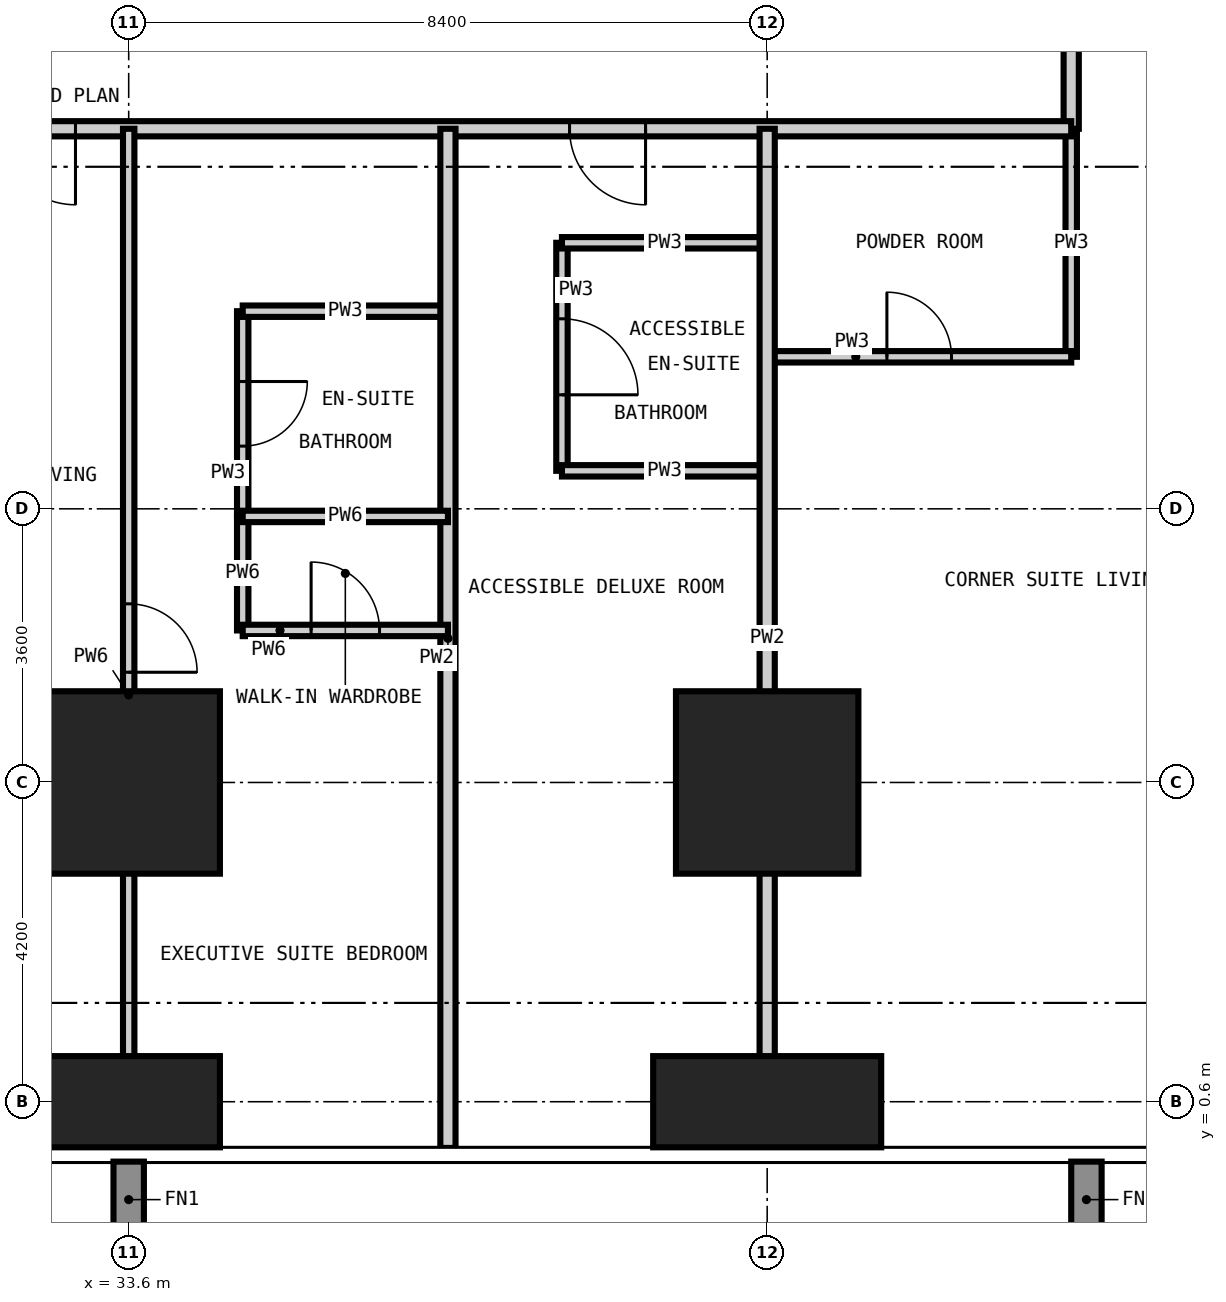
"""IFC4 building model, lengths in metres.
Left out: names, types, materials, properties, quantities, classifications, styles, units other than length and angle.
Written with IfcOpenShell. Run it as: python <this file> out.ifc"""

import sys

from ifc_helpers import new_model, si_unit, direction, frame, frame_2d, origin, origin_2d, place, context, subcontext, project, spatial, rectangle, extrude, element, fill, save


model = new_model("IFC4")
c1 = context("Model", 3, precision=1e-05, world=origin(), true_north=direction((0.0, 1.0)))
c2 = subcontext(c1, "Body", "Model", "MODEL_VIEW")
j1 = project(units=[si_unit("LENGTHUNIT", "METRE"), si_unit("PLANEANGLEUNIT", "RADIAN")], contexts=[c1])
p1 = place(None, origin())
s1 = spatial("IfcSite", under=j1, at=p1, CompositionType="ELEMENT")
p2 = place(p1, origin())
s2 = spatial("IfcBuilding", under=s1, at=p2, CompositionType="ELEMENT")
p3 = place(p2, frame((0.0, 0.0, 84.6)))
s3 = spatial("IfcBuildingStorey", under=s2, at=p3, CompositionType="ELEMENT", Elevation=84.6)
p4 = place(p3, frame((33.6, 0.6, -0.35), z_axis=(0.0, 0.0, 1.0), x_axis=(1.0, 0.0, 0.0)))
e1 = element("IfcColumn", 1, at=p4, inside=s3, PredefinedType="COLUMN", context=c2, shape_type="SweptSolid", body=[
    extrude(rectangle(XDim=2.4, YDim=1.2, at=origin_2d()), origin(), (0.0, 0.0, 1.0), 3.55),
])
p5 = place(p3, frame((33.6, 4.8, -0.35), z_axis=(0.0, 0.0, 1.0), x_axis=(1.0, 0.0, 0.0)))
e2 = element("IfcColumn", 2, at=p5, inside=s3, PredefinedType="COLUMN", context=c2, shape_type="SweptSolid", body=[
    extrude(rectangle(XDim=2.4, YDim=2.4, at=origin_2d()), origin(), (0.0, 0.0, 1.0), 3.55),
])
p6 = place(p3, frame((42.0, 0.6, -0.35), z_axis=(0.0, 0.0, 1.0), x_axis=(1.0, 0.0, 0.0)))
e3 = element("IfcColumn", 3, at=p6, inside=s3, PredefinedType="COLUMN", context=c2, shape_type="SweptSolid", body=[
    extrude(rectangle(XDim=3.0, YDim=1.2, at=origin_2d()), origin(), (0.0, 0.0, 1.0), 3.55),
])
p7 = place(p3, frame((42.0, 4.8, -0.35), z_axis=(0.0, 0.0, 1.0), x_axis=(1.0, 0.0, 0.0)))
e4 = element("IfcColumn", 4, at=p7, inside=s3, PredefinedType="COLUMN", context=c2, shape_type="SweptSolid", body=[
    extrude(rectangle(XDim=2.4, YDim=2.4, at=origin_2d()), origin(), (0.0, 0.0, 1.0), 3.55),
])
p8 = place(p3, frame((35.1, 8.3, 0.0), z_axis=(0.0, 0.0, 1.0), x_axis=(0.0, 1.0, 0.0)))
e5 = element("IfcWall", 5, at=p8, inside=s3, PredefinedType="PARTITIONING", context=c2, shape_type="SweptSolid", body=[
    extrude(rectangle(XDim=2.7, YDim=0.15, at=frame_2d((1.35, 0.0))), origin(), (0.0, 0.0, 1.0), 3.2),
])
p9 = place(p8, frame((0.925, 0.0, 0.0)))
e6 = element("IfcOpeningElement", 6, at=p9, cuts=e5, PredefinedType="OPENING", context=c2, shape_type="SweptSolid", body=[
    extrude(rectangle(XDim=0.85, YDim=2.1, at=frame_2d((0.425, 1.05))), frame((0.0, 0.085, 0.0), z_axis=(0.0, -1.0, 0.0), x_axis=(1.0, 0.0, 0.0)), (0.0, 0.0, 1.0), 0.17),
])
p10 = place(p3, frame((39.3, 8.9, 0.0), z_axis=(0.0, 0.0, 1.0), x_axis=(0.0, 1.0, 0.0)))
e7 = element("IfcWall", 7, at=p10, inside=s3, PredefinedType="PARTITIONING", context=c2, shape_type="SweptSolid", body=[
    extrude(rectangle(XDim=3.0, YDim=0.15, at=frame_2d((1.5, 0.0))), origin(), (0.0, 0.0, 1.0), 3.2),
])
p11 = place(p10, frame((1.0, 0.0, 0.0)))
e8 = element("IfcOpeningElement", 8, at=p11, cuts=e7, PredefinedType="OPENING", context=c2, shape_type="SweptSolid", body=[
    extrude(rectangle(XDim=1.0, YDim=2.1, at=frame_2d((0.5, 1.05))), frame((0.0, 0.085, 0.0), z_axis=(0.0, -1.0, 0.0), x_axis=(1.0, 0.0, 0.0)), (0.0, 0.0, 1.0), 0.17),
])
p12 = place(p3, frame((46.0, 10.4, 0.0), z_axis=(0.0, 0.0, 1.0), x_axis=(0.0, 1.0, 0.0)))
e9 = element("IfcWall", 9, at=p12, inside=s3, PredefinedType="PARTITIONING", context=c2, shape_type="SweptSolid", body=[
    extrude(rectangle(XDim=3.0, YDim=0.15, at=frame_2d((1.5, 0.0))), origin(), (0.0, 0.0, 1.0), 3.2),
])
p13 = place(p3, frame((39.3, 8.9, 0.0), z_axis=(0.0, 0.0, 1.0), x_axis=(1.0, 0.0, 0.0)))
e10 = element("IfcWall", 10, at=p13, inside=s3, PredefinedType="PARTITIONING", context=c2, shape_type="SweptSolid", body=[
    extrude(rectangle(XDim=2.7, YDim=0.15, at=frame_2d((1.35, 0.0))), origin(), (0.0, 0.0, 1.0), 3.2),
])
p14 = place(p3, frame((42.0, 10.4, 0.0), z_axis=(0.0, 0.0, 1.0), x_axis=(1.0, 0.0, 0.0)))
e11 = element("IfcWall", 11, at=p14, inside=s3, PredefinedType="PARTITIONING", context=c2, shape_type="SweptSolid", body=[
    extrude(rectangle(XDim=4.0, YDim=0.15, at=frame_2d((2.0, 0.0))), origin(), (0.0, 0.0, 1.0), 3.2),
])
p15 = place(p14, frame((1.575, 0.0, 0.0)))
e12 = element("IfcOpeningElement", 12, at=p15, cuts=e11, PredefinedType="OPENING", context=c2, shape_type="SweptSolid", body=[
    extrude(rectangle(XDim=0.85, YDim=2.1, at=frame_2d((0.425, 1.05))), frame((0.0, 0.085, 0.0), z_axis=(0.0, -1.0, 0.0), x_axis=(1.0, 0.0, 0.0)), (0.0, 0.0, 1.0), 0.17),
])
for number, where, z_axis, x_axis in (
    (13, (35.1, 11.0, 0.0), (0.0, 0.0, 1.0), (1.0, 0.0, 0.0)),
    (14, (39.3, 11.9, 0.0), (0.0, 0.0, 1.0), (1.0, 0.0, 0.0)),
):
    element("IfcWall", number, at=place(p3, frame(where, z_axis=z_axis, x_axis=x_axis)), inside=s3, PredefinedType="PARTITIONING", context=c2, shape_type="SweptSolid", body=[
        extrude(rectangle(XDim=2.7, YDim=0.15, at=frame_2d((1.35, 0.0))), origin(), (0.0, 0.0, 1.0), 3.2),
    ])
p16 = place(p3, frame((46.0, 44.8, 0.0), z_axis=(0.0, 0.0, 1.0), x_axis=(0.0, -1.0, 0.0)))
e15 = element("IfcWall", 15, at=p16, inside=s3, PredefinedType="PARTITIONING", context=c2, shape_type="SweptSolid", body=[
    extrude(rectangle(XDim=31.4, YDim=0.2, at=frame_2d((15.7, 0.0))), origin(), (0.0, 0.0, 1.0), 3.2),
])
p17 = place(p16, frame((21.2, 0.0, 0.0)))
e16 = element("IfcOpeningElement", 16, at=p17, cuts=e15, PredefinedType="OPENING", context=c2, shape_type="SweptSolid", body=[
    extrude(rectangle(XDim=1.0, YDim=2.2, at=frame_2d((0.5, 1.1))), frame((0.0, 0.11, 0.0), z_axis=(0.0, -1.0, 0.0), x_axis=(1.0, 0.0, 0.0)), (0.0, 0.0, 1.0), 0.22),
])
p18 = place(p16, frame((8.6, 0.0, 0.0)))
e17 = element("IfcOpeningElement", 17, at=p18, cuts=e15, PredefinedType="OPENING", context=c2, shape_type="SweptSolid", body=[
    extrude(rectangle(XDim=1.0, YDim=2.2, at=frame_2d((0.5, 1.1))), frame((0.0, 0.11, 0.0), z_axis=(0.0, -1.0, 0.0), x_axis=(1.0, 0.0, 0.0)), (0.0, 0.0, 1.0), 0.22),
])
p19 = place(p16, frame((29.2, 0.0, 0.0)))
e18 = element("IfcOpeningElement", 18, at=p19, cuts=e15, PredefinedType="OPENING", context=c2, shape_type="SweptSolid", body=[
    extrude(rectangle(XDim=1.0, YDim=2.2, at=frame_2d((0.5, 1.1))), frame((0.0, 0.11, 0.0), z_axis=(0.0, -1.0, 0.0), x_axis=(1.0, 0.0, 0.0)), (0.0, 0.0, 1.0), 0.22),
])
p20 = place(p16, frame((0.9, 0.0, 0.0)))
e19 = element("IfcOpeningElement", 19, at=p20, cuts=e15, PredefinedType="OPENING", context=c2, shape_type="SweptSolid", body=[
    extrude(rectangle(XDim=1.0, YDim=2.2, at=frame_2d((0.5, 1.1))), frame((0.0, 0.11, 0.0), z_axis=(0.0, -1.0, 0.0), x_axis=(1.0, 0.0, 0.0)), (0.0, 0.0, 1.0), 0.22),
])
p21 = place(p3, frame((46.0, 13.4, 0.0), z_axis=(0.0, 0.0, 1.0), x_axis=(-1.0, 0.0, 0.0)))
e20 = element("IfcWall", 20, at=p21, inside=s3, PredefinedType="PARTITIONING", context=c2, shape_type="SweptSolid", body=[
    extrude(rectangle(XDim=32.6, YDim=0.2, at=frame_2d((16.3, 0.0))), origin(), (0.0, 0.0, 1.0), 3.2),
])
p22 = place(p21, frame((26.6, 0.0, 0.0)))
e21 = element("IfcOpeningElement", 21, at=p22, cuts=e20, PredefinedType="OPENING", context=c2, shape_type="SweptSolid", body=[
    extrude(rectangle(XDim=1.0, YDim=2.2, at=frame_2d((0.5, 1.1))), frame((0.0, 0.11, 0.0), z_axis=(0.0, -1.0, 0.0), x_axis=(1.0, 0.0, 0.0)), (0.0, 0.0, 1.0), 0.22),
])
p23 = place(p21, frame((19.1, 0.0, 0.0)))
e22 = element("IfcOpeningElement", 22, at=p23, cuts=e20, PredefinedType="OPENING", context=c2, shape_type="SweptSolid", body=[
    extrude(rectangle(XDim=1.0, YDim=2.2, at=frame_2d((0.5, 1.1))), frame((0.0, 0.11, 0.0), z_axis=(0.0, -1.0, 0.0), x_axis=(1.0, 0.0, 0.0)), (0.0, 0.0, 1.0), 0.22),
])
p24 = place(p21, frame((13.1, 0.0, 0.0)))
e23 = element("IfcOpeningElement", 23, at=p24, cuts=e20, PredefinedType="OPENING", context=c2, shape_type="SweptSolid", body=[
    extrude(rectangle(XDim=1.0, YDim=2.2, at=frame_2d((0.5, 1.1))), frame((0.0, 0.11, 0.0), z_axis=(0.0, -1.0, 0.0), x_axis=(1.0, 0.0, 0.0)), (0.0, 0.0, 1.0), 0.22),
])
p25 = place(p21, frame((5.6, 0.0, 0.0)))
e24 = element("IfcOpeningElement", 24, at=p25, cuts=e20, PredefinedType="OPENING", context=c2, shape_type="SweptSolid", body=[
    extrude(rectangle(XDim=1.0, YDim=2.2, at=frame_2d((0.5, 1.1))), frame((0.0, 0.11, 0.0), z_axis=(0.0, -1.0, 0.0), x_axis=(1.0, 0.0, 0.0)), (0.0, 0.0, 1.0), 0.22),
])
for number, where, z_axis, x_axis in (
    (25, (37.8, -0.008, 0.0), (0.0, 0.0, 1.0), (0.0, 1.0, 0.0)),
    (26, (42.0, -0.008, 0.0), (0.0, 0.0, 1.0), (0.0, 1.0, 0.0)),
):
    element("IfcWall", number, at=place(p3, frame(where, z_axis=z_axis, x_axis=x_axis)), inside=s3, PredefinedType="PARTITIONING", context=c2, shape_type="SweptSolid", body=[
        extrude(rectangle(XDim=13.408, YDim=0.2, at=frame_2d((6.704, 0.0))), origin(), (0.0, 0.0, 1.0), 3.2),
    ])
p26 = place(p3, frame((33.6, -0.008, 0.0), z_axis=(0.0, 0.0, 1.0), x_axis=(0.0, 1.0, 0.0)))
e27 = element("IfcWall", 27, at=p26, inside=s3, PredefinedType="PARTITIONING", context=c2, shape_type="SweptSolid", body=[
    extrude(rectangle(XDim=13.408, YDim=0.15, at=frame_2d((6.704, 0.0))), origin(), (0.0, 0.0, 1.0), 3.2),
])
p27 = place(p26, frame((6.258, 0.0, 0.0)))
e28 = element("IfcOpeningElement", 28, at=p27, cuts=e27, PredefinedType="OPENING", context=c2, shape_type="SweptSolid", body=[
    extrude(rectangle(XDim=0.9, YDim=2.1, at=frame_2d((0.45, 1.05))), frame((0.0, 0.085, 0.0), z_axis=(0.0, -1.0, 0.0), x_axis=(1.0, 0.0, 0.0)), (0.0, 0.0, 1.0), 0.17),
])
p28 = place(p3, frame((35.1, 6.8, 0.0), z_axis=(0.0, 0.0, 1.0), x_axis=(0.0, 1.0, 0.0)))
e29 = element("IfcWall", 29, at=p28, inside=s3, PredefinedType="PARTITIONING", context=c2, shape_type="SweptSolid", body=[
    extrude(rectangle(XDim=1.5, YDim=0.15, at=frame_2d((0.75, 0.0))), origin(), (0.0, 0.0, 1.0), 3.2),
])
p29 = place(p3, frame((35.1, 6.8, 0.0), z_axis=(0.0, 0.0, 1.0), x_axis=(1.0, 0.0, 0.0)))
e30 = element("IfcWall", 30, at=p29, inside=s3, PredefinedType="PARTITIONING", context=c2, shape_type="SweptSolid", body=[
    extrude(rectangle(XDim=2.7, YDim=0.15, at=frame_2d((1.35, 0.0))), origin(), (0.0, 0.0, 1.0), 3.2),
])
p30 = place(p29, frame((0.9, 0.0, 0.0)))
e31 = element("IfcOpeningElement", 31, at=p30, cuts=e30, PredefinedType="OPENING", context=c2, shape_type="SweptSolid", body=[
    extrude(rectangle(XDim=0.9, YDim=2.1, at=frame_2d((0.45, 1.05))), frame((0.0, 0.085, 0.0), z_axis=(0.0, -1.0, 0.0), x_axis=(1.0, 0.0, 0.0)), (0.0, 0.0, 1.0), 0.17),
])
p31 = place(p3, frame((35.1, 8.3, 0.0), z_axis=(0.0, 0.0, 1.0), x_axis=(1.0, 0.0, 0.0)))
e32 = element("IfcWall", 32, at=p31, inside=s3, PredefinedType="PARTITIONING", context=c2, shape_type="SweptSolid", body=[
    extrude(rectangle(XDim=2.7, YDim=0.15, at=frame_2d((1.35, 0.0))), origin(), (0.0, 0.0, 1.0), 3.2),
])
p32 = place(p24, origin())
e33 = element("IfcDoor", 33, at=p32, inside=s3, OperationType="SINGLE_SWING_LEFT", PredefinedType="DOOR", context=c2, shape_type="SweptSolid", body=[
    extrude(rectangle(XDim=1.0, YDim=2.2, at=frame_2d((0.5, 1.1))), frame((0.0, 0.025, 0.0), z_axis=(0.0, -1.0, 0.0), x_axis=(1.0, 0.0, 0.0)), (0.0, 0.0, 1.0), 0.05),
])
fill(e23, e33)
p33 = place(p27, frame((0.9, 0.0, 0.0), z_axis=(0.0, 0.0, 1.0), x_axis=(-1.0, 0.0, 0.0)))
e34 = element("IfcDoor", 34, at=p33, inside=s3, OperationType="SINGLE_SWING_RIGHT", PredefinedType="DOOR", context=c2, shape_type="SweptSolid", body=[
    extrude(rectangle(XDim=0.9, YDim=2.1, at=frame_2d((0.45, 1.05))), frame((0.0, 0.025, 0.0), z_axis=(0.0, -1.0, 0.0), x_axis=(1.0, 0.0, 0.0)), (0.0, 0.0, 1.0), 0.05),
])
fill(e28, e34)
p34 = place(p9, frame((0.85, 0.0, 0.0), z_axis=(0.0, 0.0, 1.0), x_axis=(-1.0, 0.0, 0.0)))
e35 = element("IfcDoor", 35, at=p34, inside=s3, OperationType="SINGLE_SWING_LEFT", PredefinedType="DOOR", context=c2, shape_type="SweptSolid", body=[
    extrude(rectangle(XDim=0.85, YDim=2.1, at=frame_2d((0.425, 1.05))), frame((0.0, 0.025, 0.0), z_axis=(0.0, -1.0, 0.0), x_axis=(1.0, 0.0, 0.0)), (0.0, 0.0, 1.0), 0.05),
])
fill(e6, e35)
p35 = place(p30, origin())
e36 = element("IfcDoor", 36, at=p35, inside=s3, OperationType="SINGLE_SWING_LEFT", PredefinedType="DOOR", context=c2, shape_type="SweptSolid", body=[
    extrude(rectangle(XDim=0.9, YDim=2.1, at=frame_2d((0.45, 1.05))), frame((0.0, 0.025, 0.0), z_axis=(0.0, -1.0, 0.0), x_axis=(1.0, 0.0, 0.0)), (0.0, 0.0, 1.0), 0.05),
])
fill(e31, e36)
p36 = place(p25, origin())
e37 = element("IfcDoor", 37, at=p36, inside=s3, OperationType="SINGLE_SWING_LEFT", PredefinedType="DOOR", context=c2, shape_type="SweptSolid", body=[
    extrude(rectangle(XDim=1.0, YDim=2.2, at=frame_2d((0.5, 1.1))), frame((0.0, 0.025, 0.0), z_axis=(0.0, -1.0, 0.0), x_axis=(1.0, 0.0, 0.0)), (0.0, 0.0, 1.0), 0.05),
])
fill(e24, e37)
p37 = place(p11, frame((1.0, 0.0, 0.0), z_axis=(0.0, 0.0, 1.0), x_axis=(-1.0, 0.0, 0.0)))
e38 = element("IfcDoor", 38, at=p37, inside=s3, OperationType="SINGLE_SWING_RIGHT", PredefinedType="DOOR", context=c2, shape_type="SweptSolid", body=[
    extrude(rectangle(XDim=1.0, YDim=2.1, at=frame_2d((0.5, 1.05))), frame((0.0, 0.025, 0.0), z_axis=(0.0, -1.0, 0.0), x_axis=(1.0, 0.0, 0.0)), (0.0, 0.0, 1.0), 0.05),
])
fill(e8, e38)
p38 = place(p15, origin())
e39 = element("IfcDoor", 39, at=p38, inside=s3, OperationType="SINGLE_SWING_LEFT", PredefinedType="DOOR", context=c2, shape_type="SweptSolid", body=[
    extrude(rectangle(XDim=0.85, YDim=2.1, at=frame_2d((0.425, 1.05))), frame((0.0, 0.025, 0.0), z_axis=(0.0, -1.0, 0.0), x_axis=(1.0, 0.0, 0.0)), (0.0, 0.0, 1.0), 0.05),
])
fill(e12, e39)
save(model, sys.argv[1])
